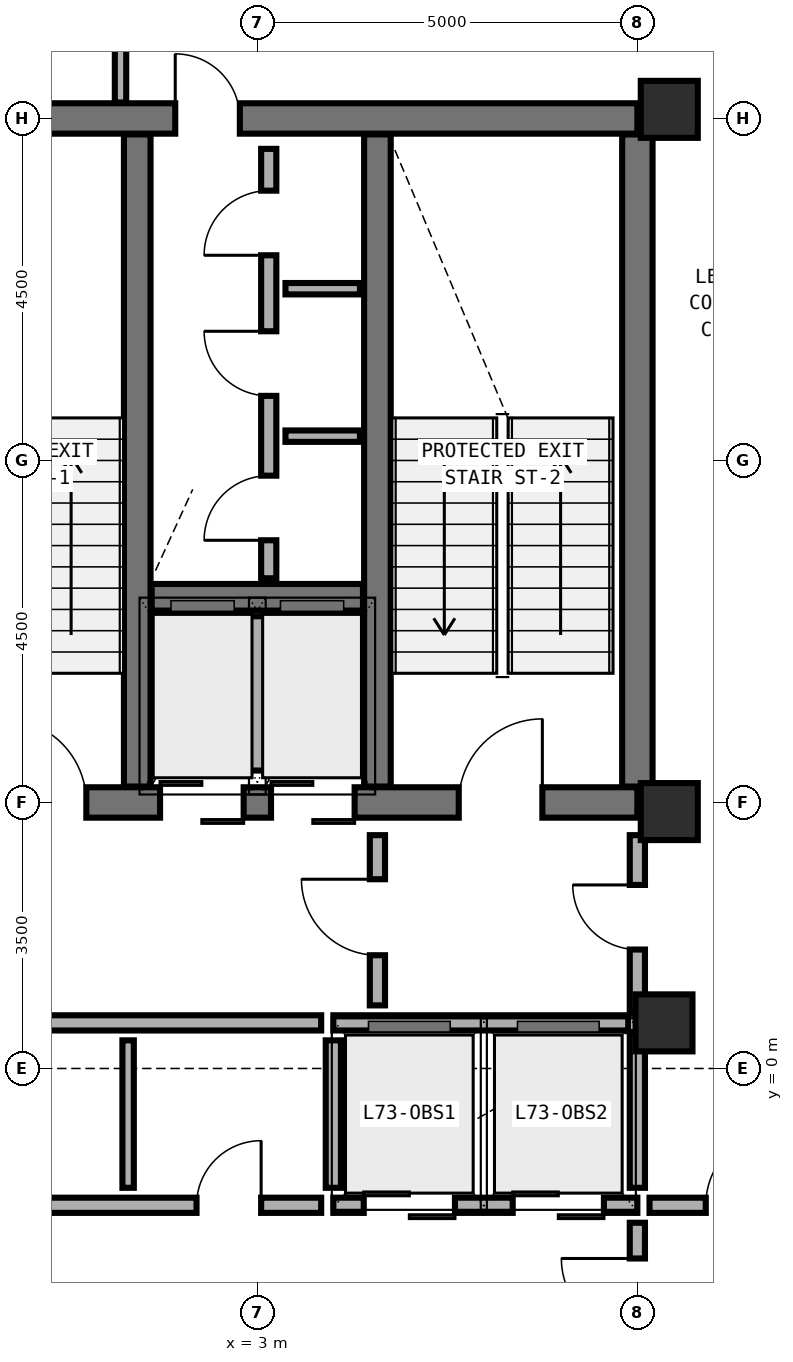
"""IFC4 building model, lengths in metres.
Left out: names, types, materials, properties, quantities, classifications, styles, units other than length and angle.
Written with IfcOpenShell. Run it as: python <this file> out.ifc"""

import sys

from ifc_helpers import new_model, si_unit, direction, frame, frame_2d, origin, origin_2d, place, context, subcontext, project, spatial, rectangle, extrude, element, fill, save


model = new_model("IFC4")
c1 = context("Model", 3, precision=1e-05, world=origin(), true_north=direction((0.0, 1.0)))
c2 = subcontext(c1, "Body", "Model", "MODEL_VIEW")
j1 = project(units=[si_unit("LENGTHUNIT", "METRE"), si_unit("PLANEANGLEUNIT", "RADIAN")], contexts=[c1])
p1 = place(None, origin())
s1 = spatial("IfcSite", under=j1, at=p1, CompositionType="ELEMENT")
p2 = place(p1, origin())
s2 = spatial("IfcBuilding", under=s1, at=p2, CompositionType="ELEMENT")
p3 = place(p2, frame((0.0, 0.0, 285.0)))
s3 = spatial("IfcBuildingStorey", under=s2, at=p3, CompositionType="ELEMENT", Elevation=285.0)
p4 = place(p3, frame((-2.0, 3.5, 0.0), z_axis=(0.0, 0.0, 1.0), x_axis=(1.0, 0.0, 0.0)))
e1 = element("IfcWall", 1, at=p4, inside=s3, PredefinedType="SHEAR", context=c2, shape_type="SweptSolid", body=[
    extrude(rectangle(XDim=10.0, YDim=0.4, at=frame_2d((5.0, 0.0))), origin(), (0.0, 0.0, 1.0), 4.492),
])
p5 = place(p4, frame((1.65, 0.0, 0.0)))
e2 = element("IfcOpeningElement", 2, at=p5, cuts=e1, PredefinedType="OPENING", context=c2, shape_type="SweptSolid", body=[
    extrude(rectangle(XDim=1.1, YDim=2.15, at=frame_2d((0.55, 1.075))), frame((0.0, 0.21, 0.0), z_axis=(0.0, -1.0, 0.0), x_axis=(1.0, 0.0, 0.0)), (0.0, 0.0, 1.0), 0.42),
])
p6 = place(p4, frame((7.65, 0.0, 0.0)))
e3 = element("IfcOpeningElement", 3, at=p6, cuts=e1, PredefinedType="OPENING", context=c2, shape_type="SweptSolid", body=[
    extrude(rectangle(XDim=1.1, YDim=2.15, at=frame_2d((0.55, 1.075))), frame((0.0, 0.21, 0.0), z_axis=(0.0, -1.0, 0.0), x_axis=(1.0, 0.0, 0.0)), (0.0, 0.0, 1.0), 0.42),
])
p7 = place(p4, frame((3.72, 0.0, 0.0)))
e4 = element("IfcOpeningElement", 4, at=p7, cuts=e1, PredefinedType="OPENING", context=c2, shape_type="SweptSolid", body=[
    extrude(rectangle(XDim=1.1, YDim=2.2, at=frame_2d((0.55, 1.1))), frame((0.0, 0.21, 0.0), z_axis=(0.0, -1.0, 0.0), x_axis=(1.0, 0.0, 0.0)), (0.0, 0.0, 1.0), 0.42),
])
p8 = place(p4, frame((5.18, 0.0, 0.0)))
e5 = element("IfcOpeningElement", 5, at=p8, cuts=e1, PredefinedType="OPENING", context=c2, shape_type="SweptSolid", body=[
    extrude(rectangle(XDim=1.1, YDim=2.2, at=frame_2d((0.55, 1.1))), frame((0.0, 0.21, 0.0), z_axis=(0.0, -1.0, 0.0), x_axis=(1.0, 0.0, 0.0)), (0.0, 0.0, 1.0), 0.42),
])
p9 = place(p3, frame((-2.0, 12.5, 0.0), z_axis=(0.0, 0.0, 1.0), x_axis=(1.0, 0.0, 0.0)))
e6 = element("IfcWall", 6, at=p9, inside=s3, PredefinedType="SHEAR", context=c2, shape_type="SweptSolid", body=[
    extrude(rectangle(XDim=10.0, YDim=0.4, at=frame_2d((5.0, 0.0))), origin(), (0.0, 0.0, 1.0), 4.492),
])
p10 = place(p9, frame((3.92, 0.0, 0.0)))
e7 = element("IfcOpeningElement", 7, at=p10, cuts=e6, PredefinedType="OPENING", context=c2, shape_type="SweptSolid", body=[
    extrude(rectangle(XDim=0.85, YDim=2.1, at=frame_2d((0.425, 1.05))), frame((0.0, 0.21, 0.0), z_axis=(0.0, -1.0, 0.0), x_axis=(1.0, 0.0, 0.0)), (0.0, 0.0, 1.0), 0.42),
])
p11 = place(p3, frame((8.0, 3.71, 0.0), z_axis=(0.0, 0.0, 1.0), x_axis=(0.0, 1.0, 0.0)))
e8 = element("IfcWall", 8, at=p11, inside=s3, PredefinedType="SHEAR", context=c2, shape_type="SweptSolid", body=[
    extrude(rectangle(XDim=8.58, YDim=0.4, at=frame_2d((4.29, 0.0))), origin(), (0.0, 0.0, 1.0), 4.492),
])
for number, where, z_axis, x_axis in (
    (9, (1.42, 3.71, 0.0), (0.0, 0.0, 1.0), (0.0, 1.0, 0.0)),
    (10, (4.58, 3.71, 0.0), (0.0, 0.0, 1.0), (0.0, 1.0, 0.0)),
):
    element("IfcWall", number, at=place(p3, frame(where, z_axis=z_axis, x_axis=x_axis)), inside=s3, PredefinedType="SHEAR", context=c2, shape_type="SweptSolid", body=[
        extrude(rectangle(XDim=8.58, YDim=0.35, at=frame_2d((4.29, 0.0))), origin(), (0.0, 0.0, 1.0), 4.492),
    ])
p12 = place(p3, frame((1.61, 6.2, 0.0), z_axis=(0.0, 0.0, 1.0), x_axis=(1.0, 0.0, 0.0)))
e11 = element("IfcWall", 11, at=p12, inside=s3, PredefinedType="SHEAR", context=c2, shape_type="SweptSolid", body=[
    extrude(rectangle(XDim=2.78, YDim=0.35, at=frame_2d((1.39, 0.0))), origin(), (0.0, 0.0, 1.0), 4.492),
])
for number, where, z_axis, x_axis in (
    (12, (8.42, 12.62, 0.0), (0.0, 0.0, 1.0), (1.0, 0.0, 0.0)),
    (13, (8.42, 3.38, 0.0), (0.0, 0.0, 1.0), (1.0, 0.0, 0.0)),
    (14, (8.35, 0.6, 0.0), (0.0, 0.0, 1.0), (1.0, 0.0, 0.0)),
):
    element("IfcColumn", number, at=place(p3, frame(where, z_axis=z_axis, x_axis=x_axis)), inside=s3, PredefinedType="COLUMN", context=c2, shape_type="SweptSolid", body=[
        extrude(rectangle(XDim=0.75, YDim=0.75, at=origin_2d()), origin(), (0.0, 0.0, 1.0), 4.475),
    ])
p13 = place(p3, frame((3.0, 3.92, 0.0), z_axis=(0.0, 0.0, 1.0), x_axis=(0.0, 1.0, 0.0)))
e15 = element("IfcWall", 15, at=p13, inside=s3, PredefinedType="SOLIDWALL", context=c2, shape_type="SweptSolid", body=[
    extrude(rectangle(XDim=2.03, YDim=0.2, at=frame_2d((1.015, 0.0))), origin(), (0.0, 0.0, 1.0), 4.08),
])
p14 = place(p3, frame((4.0, 0.6, 0.0), z_axis=(0.0, 0.0, 1.0), x_axis=(1.0, 0.0, 0.0)))
e16 = element("IfcWall", 16, at=p14, inside=s3, PredefinedType="SOLIDWALL", context=c2, shape_type="SweptSolid", body=[
    extrude(rectangle(XDim=3.88, YDim=0.2, at=frame_2d((1.94, 0.0))), origin(), (0.0, 0.0, 1.0), 3.792),
])
p15 = place(p3, frame((4.0, -1.8, 0.0), z_axis=(0.0, 0.0, 1.0), x_axis=(1.0, 0.0, 0.0)))
e17 = element("IfcWall", 17, at=p15, inside=s3, PredefinedType="SOLIDWALL", context=c2, shape_type="SweptSolid", body=[
    extrude(rectangle(XDim=4.0, YDim=0.2, at=frame_2d((2.0, 0.0))), origin(), (0.0, 0.0, 1.0), 4.08),
])
p16 = place(p15, frame((0.4, 0.0, 0.0)))
e18 = element("IfcOpeningElement", 18, at=p16, cuts=e17, PredefinedType="OPENING", context=c2, shape_type="SweptSolid", body=[
    extrude(rectangle(XDim=1.2, YDim=2.25, at=frame_2d((0.6, 1.125))), frame((0.0, 0.11, 0.0), z_axis=(0.0, -1.0, 0.0), x_axis=(1.0, 0.0, 0.0)), (0.0, 0.0, 1.0), 0.22),
])
p17 = place(p15, frame((2.36, 0.0, 0.0)))
e19 = element("IfcOpeningElement", 19, at=p17, cuts=e17, PredefinedType="OPENING", context=c2, shape_type="SweptSolid", body=[
    extrude(rectangle(XDim=1.2, YDim=2.25, at=frame_2d((0.6, 1.125))), frame((0.0, 0.11, 0.0), z_axis=(0.0, -1.0, 0.0), x_axis=(1.0, 0.0, 0.0)), (0.0, 0.0, 1.0), 0.22),
])
p18 = place(p3, frame((4.0, -1.57, 0.0), z_axis=(0.0, 0.0, 1.0), x_axis=(0.0, 1.0, 0.0)))
e20 = element("IfcWall", 20, at=p18, inside=s3, PredefinedType="SOLIDWALL", context=c2, shape_type="SweptSolid", body=[
    extrude(rectangle(XDim=1.94, YDim=0.2, at=frame_2d((0.97, 0.0))), origin(), (0.0, 0.0, 1.0), 4.08),
])
p19 = place(p3, frame((8.0, -1.57, 0.0), z_axis=(0.0, 0.0, 1.0), x_axis=(0.0, 1.0, 0.0)))
e21 = element("IfcWall", 21, at=p19, inside=s3, PredefinedType="SOLIDWALL", context=c2, shape_type="SweptSolid", body=[
    extrude(rectangle(XDim=2.05, YDim=0.2, at=frame_2d((1.025, 0.0))), origin(), (0.0, 0.0, 1.0), 3.792),
])
p20 = place(p3, frame((3.15, 6.45, 0.0), z_axis=(0.0, 0.0, 1.0), x_axis=(0.0, 1.0, 0.0)))
e22 = element("IfcWall", 22, at=p20, inside=s3, PredefinedType="MOVABLE", context=c2, shape_type="SweptSolid", body=[
    extrude(rectangle(XDim=5.65, YDim=0.2, at=frame_2d((2.825, 0.0))), origin(), (0.0, 0.0, 1.0), 4.08),
])
p21 = place(p20, frame((0.5, 0.0, 0.0)))
e23 = element("IfcOpeningElement", 23, at=p21, cuts=e22, PredefinedType="OPENING", context=c2, shape_type="SweptSolid", body=[
    extrude(rectangle(XDim=0.85, YDim=2.1, at=frame_2d((0.425, 1.05))), frame((0.0, 0.11, 0.0), z_axis=(0.0, -1.0, 0.0), x_axis=(1.0, 0.0, 0.0)), (0.0, 0.0, 1.0), 0.22),
])
p22 = place(p20, frame((2.4, 0.0, 0.0)))
e24 = element("IfcOpeningElement", 24, at=p22, cuts=e22, PredefinedType="OPENING", context=c2, shape_type="SweptSolid", body=[
    extrude(rectangle(XDim=0.85, YDim=2.1, at=frame_2d((0.425, 1.05))), frame((0.0, 0.11, 0.0), z_axis=(0.0, -1.0, 0.0), x_axis=(1.0, 0.0, 0.0)), (0.0, 0.0, 1.0), 0.22),
])
p23 = place(p20, frame((4.25, 0.0, 0.0)))
e25 = element("IfcOpeningElement", 25, at=p23, cuts=e22, PredefinedType="OPENING", context=c2, shape_type="SweptSolid", body=[
    extrude(rectangle(XDim=0.85, YDim=2.1, at=frame_2d((0.425, 1.05))), frame((0.0, 0.11, 0.0), z_axis=(0.0, -1.0, 0.0), x_axis=(1.0, 0.0, 0.0)), (0.0, 0.0, 1.0), 0.22),
])
p24 = place(p3, frame((4.58, 0.83, 0.0), z_axis=(0.0, 0.0, 1.0), x_axis=(0.0, 1.0, 0.0)))
e26 = element("IfcWall", 26, at=p24, inside=s3, PredefinedType="MOVABLE", context=c2, shape_type="SweptSolid", body=[
    extrude(rectangle(XDim=2.24, YDim=0.2, at=frame_2d((1.12, 0.0))), origin(), (0.0, 0.0, 1.0), 4.08),
])
p25 = place(p24, frame((0.66, 0.0, 0.0)))
e27 = element("IfcOpeningElement", 27, at=p25, cuts=e26, PredefinedType="OPENING", context=c2, shape_type="SweptSolid", body=[
    extrude(rectangle(XDim=1.0, YDim=2.1, at=frame_2d((0.5, 1.05))), frame((0.0, 0.11, 0.0), z_axis=(0.0, -1.0, 0.0), x_axis=(1.0, 0.0, 0.0)), (0.0, 0.0, 1.0), 0.22),
])
p26 = place(p3, frame((8.0, 0.72, 0.0), z_axis=(0.0, 0.0, 1.0), x_axis=(0.0, 1.0, 0.0)))
e28 = element("IfcWall", 28, at=p26, inside=s3, PredefinedType="MOVABLE", context=c2, shape_type="SweptSolid", body=[
    extrude(rectangle(XDim=2.35, YDim=0.2, at=frame_2d((1.175, 0.0))), origin(), (0.0, 0.0, 1.0), 3.412),
])
p27 = place(p26, frame((0.845, 0.0, 0.0)))
e29 = element("IfcOpeningElement", 29, at=p27, cuts=e28, PredefinedType="OPENING", context=c2, shape_type="SweptSolid", body=[
    extrude(rectangle(XDim=0.85, YDim=2.1, at=frame_2d((0.425, 1.05))), frame((0.0, 0.11, 0.0), z_axis=(0.0, -1.0, 0.0), x_axis=(1.0, 0.0, 0.0)), (0.0, 0.0, 1.0), 0.22),
])
p28 = place(p3, frame((8.0, -3.97, 0.0), z_axis=(0.0, 0.0, 1.0), x_axis=(0.0, 1.0, 0.0)))
e30 = element("IfcWall", 30, at=p28, inside=s3, PredefinedType="MOVABLE", context=c2, shape_type="SweptSolid", body=[
    extrude(rectangle(XDim=1.94, YDim=0.2, at=frame_2d((0.97, 0.0))), origin(), (0.0, 0.0, 1.0), 3.792),
])
p29 = place(p28, frame((0.47, 0.0, 0.0)))
e31 = element("IfcOpeningElement", 31, at=p29, cuts=e30, PredefinedType="OPENING", context=c2, shape_type="SweptSolid", body=[
    extrude(rectangle(XDim=1.0, YDim=2.1, at=frame_2d((0.5, 1.05))), frame((0.0, 0.11, 0.0), z_axis=(0.0, -1.0, 0.0), x_axis=(1.0, 0.0, 0.0)), (0.0, 0.0, 1.0), 0.22),
])
p30 = place(p3, frame((-1.89, -1.8, 0.0), z_axis=(0.0, 0.0, 1.0), x_axis=(1.0, 0.0, 0.0)))
e32 = element("IfcWall", 32, at=p30, inside=s3, PredefinedType="MOVABLE", context=c2, shape_type="SweptSolid", body=[
    extrude(rectangle(XDim=5.73, YDim=0.2, at=frame_2d((2.865, 0.0))), origin(), (0.0, 0.0, 1.0), 4.08),
])
p31 = place(p30, frame((1.04, 0.0, 0.0)))
e33 = element("IfcOpeningElement", 33, at=p31, cuts=e32, PredefinedType="OPENING", context=c2, shape_type="SweptSolid", body=[
    extrude(rectangle(XDim=0.85, YDim=2.1, at=frame_2d((0.425, 1.05))), frame((0.0, 0.11, 0.0), z_axis=(0.0, -1.0, 0.0), x_axis=(1.0, 0.0, 0.0)), (0.0, 0.0, 1.0), 0.22),
])
p32 = place(p30, frame((4.09, 0.0, 0.0)))
e34 = element("IfcOpeningElement", 34, at=p32, cuts=e32, PredefinedType="OPENING", context=c2, shape_type="SweptSolid", body=[
    extrude(rectangle(XDim=0.85, YDim=2.1, at=frame_2d((0.425, 1.05))), frame((0.0, 0.11, 0.0), z_axis=(0.0, -1.0, 0.0), x_axis=(1.0, 0.0, 0.0)), (0.0, 0.0, 1.0), 0.22),
])
p33 = place(p3, frame((8.16, -1.8, 0.0), z_axis=(0.0, 0.0, 1.0), x_axis=(1.0, 0.0, 0.0)))
e35 = element("IfcWall", 35, at=p33, inside=s3, PredefinedType="MOVABLE", context=c2, shape_type="SweptSolid", body=[
    extrude(rectangle(XDim=2.64, YDim=0.2, at=frame_2d((1.32, 0.0))), origin(), (0.0, 0.0, 1.0), 4.08),
])
p34 = place(p33, frame((0.74, 0.0, 0.0)))
e36 = element("IfcOpeningElement", 36, at=p34, cuts=e35, PredefinedType="OPENING", context=c2, shape_type="SweptSolid", body=[
    extrude(rectangle(XDim=1.0, YDim=2.1, at=frame_2d((0.5, 1.05))), frame((0.0, 0.11, 0.0), z_axis=(0.0, -1.0, 0.0), x_axis=(1.0, 0.0, 0.0)), (0.0, 0.0, 1.0), 0.22),
])
for number, where, z_axis, x_axis in (
    (37, (3.37, 8.32, 0.0), (0.0, 0.0, 1.0), (1.0, 0.0, 0.0)),
    (38, (3.37, 10.26, 0.0), (0.0, 0.0, 1.0), (1.0, 0.0, 0.0)),
):
    element("IfcWall", number, at=place(p3, frame(where, z_axis=z_axis, x_axis=x_axis)), inside=s3, PredefinedType="PARTITIONING", context=c2, shape_type="SweptSolid", body=[
        extrude(rectangle(XDim=0.98, YDim=0.15, at=frame_2d((0.49, 0.0))), origin(), (0.0, 0.0, 1.0), 4.08),
    ])
p35 = place(p3, frame((-1.88, 0.6, 0.0), z_axis=(0.0, 0.0, 1.0), x_axis=(1.0, 0.0, 0.0)))
e39 = element("IfcWall", 39, at=p35, inside=s3, PredefinedType="MOVABLE", context=c2, shape_type="SweptSolid", body=[
    extrude(rectangle(XDim=5.72, YDim=0.2, at=frame_2d((2.86, 0.0))), origin(), (0.0, 0.0, 1.0), 3.792),
])
p36 = place(p3, frame((1.3, -1.57, 0.0), z_axis=(0.0, 0.0, 1.0), x_axis=(0.0, 1.0, 0.0)))
e40 = element("IfcWall", 40, at=p36, inside=s3, PredefinedType="PARTITIONING", context=c2, shape_type="SweptSolid", body=[
    extrude(rectangle(XDim=1.94, YDim=0.15, at=frame_2d((0.97, 0.0))), origin(), (0.0, 0.0, 1.0), 4.08),
])
p37 = place(p3, frame((1.2, 14.615, 0.0), z_axis=(0.0, 0.0, 1.0), x_axis=(0.0, -1.0, 0.0)))
e41 = element("IfcWall", 41, at=p37, inside=s3, PredefinedType="PARTITIONING", context=c2, shape_type="SweptSolid", body=[
    extrude(rectangle(XDim=1.905, YDim=0.15, at=frame_2d((0.953, 0.0))), origin(), (0.0, 0.0, 1.0), 4.08),
])
p38 = place(p5, origin())
e42 = element("IfcDoor", 42, at=p38, inside=s3, OperationType="SINGLE_SWING_LEFT", PredefinedType="DOOR", context=c2, shape_type="SweptSolid", body=[
    extrude(rectangle(XDim=1.1, YDim=2.15, at=frame_2d((0.55, 1.075))), frame((0.0, 0.025, 0.0), z_axis=(0.0, -1.0, 0.0), x_axis=(1.0, 0.0, 0.0)), (0.0, 0.0, 1.0), 0.05),
])
fill(e2, e42)
p39 = place(p6, origin())
e43 = element("IfcDoor", 43, at=p39, inside=s3, OperationType="SINGLE_SWING_RIGHT", PredefinedType="DOOR", context=c2, shape_type="SweptSolid", body=[
    extrude(rectangle(XDim=1.1, YDim=2.15, at=frame_2d((0.55, 1.075))), frame((0.0, 0.025, 0.0), z_axis=(0.0, -1.0, 0.0), x_axis=(1.0, 0.0, 0.0)), (0.0, 0.0, 1.0), 0.05),
])
fill(e3, e43)
p40 = place(p7, origin())
e44 = element("IfcDoor", 44, at=p40, inside=s3, OperationType="DOUBLE_DOOR_SLIDING", PredefinedType="DOOR", context=c2, shape_type="SweptSolid", body=[
    extrude(rectangle(XDim=1.1, YDim=2.2, at=frame_2d((0.55, 1.1))), frame((0.0, 0.025, 0.0), z_axis=(0.0, -1.0, 0.0), x_axis=(1.0, 0.0, 0.0)), (0.0, 0.0, 1.0), 0.05),
])
fill(e4, e44)
p41 = place(p8, origin())
e45 = element("IfcDoor", 45, at=p41, inside=s3, OperationType="DOUBLE_DOOR_SLIDING", PredefinedType="DOOR", context=c2, shape_type="SweptSolid", body=[
    extrude(rectangle(XDim=1.1, YDim=2.2, at=frame_2d((0.55, 1.1))), frame((0.0, 0.025, 0.0), z_axis=(0.0, -1.0, 0.0), x_axis=(1.0, 0.0, 0.0)), (0.0, 0.0, 1.0), 0.05),
])
fill(e5, e45)
p42 = place(p10, origin())
e46 = element("IfcDoor", 46, at=p42, inside=s3, OperationType="SINGLE_SWING_LEFT", PredefinedType="DOOR", context=c2, shape_type="SweptSolid", body=[
    extrude(rectangle(XDim=0.85, YDim=2.1, at=frame_2d((0.425, 1.05))), frame((0.0, 0.025, 0.0), z_axis=(0.0, -1.0, 0.0), x_axis=(1.0, 0.0, 0.0)), (0.0, 0.0, 1.0), 0.05),
])
fill(e7, e46)
p43 = place(p21, origin())
e47 = element("IfcDoor", 47, at=p43, inside=s3, OperationType="SINGLE_SWING_LEFT", PredefinedType="DOOR", context=c2, shape_type="SweptSolid", body=[
    extrude(rectangle(XDim=0.85, YDim=2.1, at=frame_2d((0.425, 1.05))), frame((0.0, 0.025, 0.0), z_axis=(0.0, -1.0, 0.0), x_axis=(1.0, 0.0, 0.0)), (0.0, 0.0, 1.0), 0.05),
])
fill(e23, e47)
p44 = place(p22, origin())
e48 = element("IfcDoor", 48, at=p44, inside=s3, OperationType="SINGLE_SWING_RIGHT", PredefinedType="DOOR", context=c2, shape_type="SweptSolid", body=[
    extrude(rectangle(XDim=0.85, YDim=2.1, at=frame_2d((0.425, 1.05))), frame((0.0, 0.025, 0.0), z_axis=(0.0, -1.0, 0.0), x_axis=(1.0, 0.0, 0.0)), (0.0, 0.0, 1.0), 0.05),
])
fill(e24, e48)
p45 = place(p23, origin())
e49 = element("IfcDoor", 49, at=p45, inside=s3, OperationType="SINGLE_SWING_LEFT", PredefinedType="DOOR", context=c2, shape_type="SweptSolid", body=[
    extrude(rectangle(XDim=0.85, YDim=2.1, at=frame_2d((0.425, 1.05))), frame((0.0, 0.025, 0.0), z_axis=(0.0, -1.0, 0.0), x_axis=(1.0, 0.0, 0.0)), (0.0, 0.0, 1.0), 0.05),
])
fill(e25, e49)
p46 = place(p25, origin())
e50 = element("IfcDoor", 50, at=p46, inside=s3, OperationType="SINGLE_SWING_RIGHT", PredefinedType="DOOR", context=c2, shape_type="SweptSolid", body=[
    extrude(rectangle(XDim=1.0, YDim=2.1, at=frame_2d((0.5, 1.05))), frame((0.0, 0.025, 0.0), z_axis=(0.0, -1.0, 0.0), x_axis=(1.0, 0.0, 0.0)), (0.0, 0.0, 1.0), 0.05),
])
fill(e27, e50)
p47 = place(p27, origin())
e51 = element("IfcDoor", 51, at=p47, inside=s3, OperationType="SINGLE_SWING_RIGHT", PredefinedType="DOOR", context=c2, shape_type="SweptSolid", body=[
    extrude(rectangle(XDim=0.85, YDim=2.1, at=frame_2d((0.425, 1.05))), frame((0.0, 0.025, 0.0), z_axis=(0.0, -1.0, 0.0), x_axis=(1.0, 0.0, 0.0)), (0.0, 0.0, 1.0), 0.05),
])
fill(e29, e51)
p48 = place(p29, origin())
e52 = element("IfcDoor", 52, at=p48, inside=s3, OperationType="SINGLE_SWING_RIGHT", PredefinedType="DOOR", context=c2, shape_type="SweptSolid", body=[
    extrude(rectangle(XDim=1.0, YDim=2.1, at=frame_2d((0.5, 1.05))), frame((0.0, 0.025, 0.0), z_axis=(0.0, -1.0, 0.0), x_axis=(1.0, 0.0, 0.0)), (0.0, 0.0, 1.0), 0.05),
])
fill(e31, e52)
p49 = place(p32, origin())
e53 = element("IfcDoor", 53, at=p49, inside=s3, OperationType="SINGLE_SWING_RIGHT", PredefinedType="DOOR", context=c2, shape_type="SweptSolid", body=[
    extrude(rectangle(XDim=0.85, YDim=2.1, at=frame_2d((0.425, 1.05))), frame((0.0, 0.025, 0.0), z_axis=(0.0, -1.0, 0.0), x_axis=(1.0, 0.0, 0.0)), (0.0, 0.0, 1.0), 0.05),
])
fill(e34, e53)
p50 = place(p34, origin())
e54 = element("IfcDoor", 54, at=p50, inside=s3, OperationType="SINGLE_SWING_RIGHT", PredefinedType="DOOR", context=c2, shape_type="SweptSolid", body=[
    extrude(rectangle(XDim=1.0, YDim=2.1, at=frame_2d((0.5, 1.05))), frame((0.0, 0.025, 0.0), z_axis=(0.0, -1.0, 0.0), x_axis=(1.0, 0.0, 0.0)), (0.0, 0.0, 1.0), 0.05),
])
fill(e36, e54)
p51 = place(p16, origin())
e55 = element("IfcDoor", 55, at=p51, inside=s3, OperationType="DOUBLE_DOOR_SLIDING", PredefinedType="DOOR", context=c2, shape_type="SweptSolid", body=[
    extrude(rectangle(XDim=1.2, YDim=2.25, at=frame_2d((0.6, 1.125))), frame((0.0, 0.025, 0.0), z_axis=(0.0, -1.0, 0.0), x_axis=(1.0, 0.0, 0.0)), (0.0, 0.0, 1.0), 0.05),
])
fill(e18, e55)
p52 = place(p17, origin())
e56 = element("IfcDoor", 56, at=p52, inside=s3, OperationType="DOUBLE_DOOR_SLIDING", PredefinedType="DOOR", context=c2, shape_type="SweptSolid", body=[
    extrude(rectangle(XDim=1.2, YDim=2.25, at=frame_2d((0.6, 1.125))), frame((0.0, 0.025, 0.0), z_axis=(0.0, -1.0, 0.0), x_axis=(1.0, 0.0, 0.0)), (0.0, 0.0, 1.0), 0.05),
])
fill(e19, e56)
save(model, sys.argv[1])
